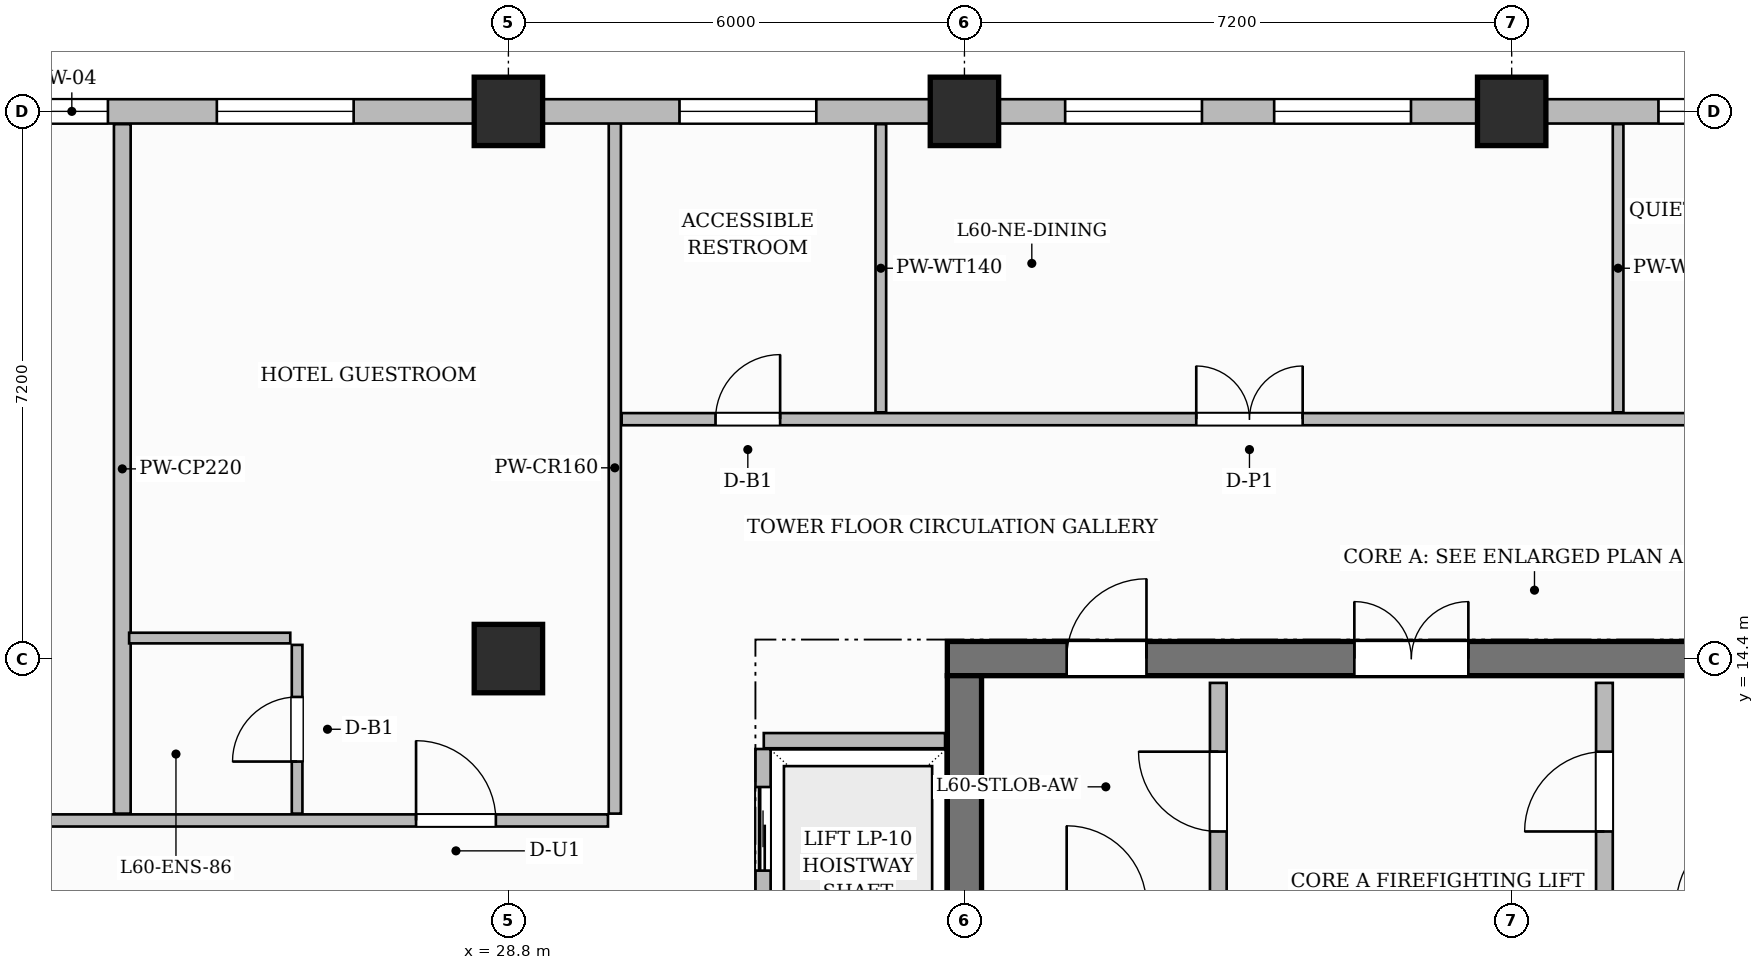
"""IFC4 building model, lengths in metres.
Left out: names, types, materials, properties, quantities, classifications, styles, units other than length and angle.
Written with IfcOpenShell. Run it as: python <this file> out.ifc"""

import sys

from ifc_helpers import new_model, si_unit, direction, frame, frame_2d, origin, origin_2d, place, context, subcontext, project, spatial, rectangle, extrude, source, transform, mapped, element, fill, save


model = new_model("IFC4")
c1 = context("Model", 3, precision=1e-05, world=origin(), true_north=direction((0.0, 1.0)))
c2 = subcontext(c1, "Body", "Model", "MODEL_VIEW")
j1 = project(units=[si_unit("LENGTHUNIT", "METRE"), si_unit("PLANEANGLEUNIT", "RADIAN")], contexts=[c1])
p1 = place(None, origin())
s1 = spatial("IfcSite", under=j1, at=p1, CompositionType="ELEMENT")
p2 = place(p1, origin())
s2 = spatial("IfcBuilding", under=s1, at=p2, CompositionType="ELEMENT")
p3 = place(p2, frame((0.0, 0.0, 240.4)))
s3 = spatial("IfcBuildingStorey", under=s2, at=p3, CompositionType="ELEMENT", Elevation=240.4)
p4 = place(p3, frame((34.575, 14.4, 0.0), z_axis=(0.0, 0.0, 1.0), x_axis=(1.0, 0.0, 0.0)))
e1 = element("IfcWall", 1, at=p4, inside=s3, PredefinedType="SHEAR", context=c2, shape_type="SweptSolid", body=[
    extrude(rectangle(XDim=15.45, YDim=0.45, at=frame_2d((7.725, 0.0))), origin(), (0.0, 0.0, 1.0), 3.85),
])
p5 = place(p4, frame((5.355, 0.0, 0.0)))
e2 = element("IfcOpeningElement", 2, at=p5, cuts=e1, PredefinedType="OPENING", context=c2, shape_type="SweptSolid", body=[
    extrude(rectangle(XDim=1.5, YDim=2.2, at=frame_2d((0.75, 1.1))), frame((0.0, 0.235, 0.0), z_axis=(0.0, -1.0, 0.0), x_axis=(1.0, 0.0, 0.0)), (0.0, 0.0, 1.0), 0.47),
])
p6 = place(p4, frame((1.57, 0.0, 0.0)))
e3 = element("IfcOpeningElement", 3, at=p6, cuts=e1, PredefinedType="OPENING", context=c2, shape_type="SweptSolid", body=[
    extrude(rectangle(XDim=1.05, YDim=2.15, at=frame_2d((0.525, 1.075))), frame((0.0, 0.235, 0.0), z_axis=(0.0, -1.0, 0.0), x_axis=(1.0, 0.0, 0.0)), (0.0, 0.0, 1.0), 0.47),
])
p7 = place(p4, frame((11.2, 0.0, 0.0)))
e4 = element("IfcOpeningElement", 4, at=p7, cuts=e1, PredefinedType="OPENING", context=c2, shape_type="SweptSolid", body=[
    extrude(rectangle(XDim=1.05, YDim=2.15, at=frame_2d((0.525, 1.075))), frame((0.0, 0.235, 0.0), z_axis=(0.0, -1.0, 0.0), x_axis=(1.0, 0.0, 0.0)), (0.0, 0.0, 1.0), 0.47),
])
p8 = place(p3, frame((34.8, 3.825, 0.0), z_axis=(0.0, 0.0, 1.0), x_axis=(0.0, 1.0, 0.0)))
e5 = element("IfcWall", 5, at=p8, inside=s3, PredefinedType="SHEAR", context=c2, shape_type="SweptSolid", body=[
    extrude(rectangle(XDim=10.35, YDim=0.45, at=frame_2d((5.175, 0.0))), origin(), (0.0, 0.0, 1.0), 3.85),
])
m1 = source(origin(), c2, "Body", "SweptSolid", [
    extrude(rectangle(XDim=0.9, YDim=0.9, at=origin_2d()), origin(), (0.0, 0.0, 1.0), 3.85),
])
for number, where, z_axis, x_axis in (
    (6, (28.8, 14.4, 0.0), (0.0, 0.0, 1.0), (1.0, 0.0, 0.0)),
    (7, (28.8, 21.6, 0.0), (0.0, 0.0, 1.0), (1.0, 0.0, 0.0)),
    (8, (34.8, 21.6, 0.0), (0.0, 0.0, 1.0), (1.0, 0.0, 0.0)),
    (9, (42.0, 21.6, 0.0), (0.0, 0.0, 1.0), (1.0, 0.0, 0.0)),
):
    element("IfcColumn", number, at=place(p3, frame(where, z_axis=z_axis, x_axis=x_axis)), inside=s3, PredefinedType="COLUMN", context=c2, shape_type="MappedRepresentation", body=[
        mapped(m1, transform((0.0, 0.0, 0.0), scale=1.0)),
    ])
p9 = place(p3, frame((38.14, 11.22, 0.0), z_axis=(0.0, 0.0, 1.0), x_axis=(0.0, 1.0, 0.0)))
e10 = element("IfcWall", 10, at=p9, inside=s3, PredefinedType="PARTITIONING", context=c2, shape_type="SweptSolid", body=[
    extrude(rectangle(XDim=2.86, YDim=0.22, at=frame_2d((1.43, 0.0))), origin(), (0.0, 0.0, 1.0), 3.6),
])
p10 = place(p9, frame((0.905, 0.0, 0.0)))
e11 = element("IfcOpeningElement", 11, at=p10, cuts=e10, PredefinedType="OPENING", context=c2, shape_type="SweptSolid", body=[
    extrude(rectangle(XDim=1.05, YDim=2.15, at=frame_2d((0.525, 1.075))), frame((0.0, 0.12, 0.0), z_axis=(0.0, -1.0, 0.0), x_axis=(1.0, 0.0, 0.0)), (0.0, 0.0, 1.0), 0.24),
])
p11 = place(p3, frame((43.22, 11.22, 0.0), z_axis=(0.0, 0.0, 1.0), x_axis=(0.0, 1.0, 0.0)))
e12 = element("IfcWall", 12, at=p11, inside=s3, PredefinedType="PARTITIONING", context=c2, shape_type="SweptSolid", body=[
    extrude(rectangle(XDim=2.86, YDim=0.22, at=frame_2d((1.43, 0.0))), origin(), (0.0, 0.0, 1.0), 3.6),
])
p12 = place(p11, frame((0.905, 0.0, 0.0)))
e13 = element("IfcOpeningElement", 13, at=p12, cuts=e12, PredefinedType="OPENING", context=c2, shape_type="SweptSolid", body=[
    extrude(rectangle(XDim=1.05, YDim=2.15, at=frame_2d((0.525, 1.075))), frame((0.0, 0.12, 0.0), z_axis=(0.0, -1.0, 0.0), x_axis=(1.0, 0.0, 0.0)), (0.0, 0.0, 1.0), 0.24),
])
p13 = place(p3, frame((32.16, 13.32, 0.0), z_axis=(0.0, 0.0, 1.0), x_axis=(1.0, 0.0, 0.0)))
e14 = element("IfcWall", 14, at=p13, inside=s3, PredefinedType="PARTITIONING", context=c2, shape_type="SweptSolid", body=[
    extrude(rectangle(XDim=2.385, YDim=0.2, at=frame_2d((1.192, 0.0))), origin(), (0.0, 0.0, 1.0), 3.6),
])
p14 = place(p3, frame((32.15, 4.39, 0.0), z_axis=(0.0, 0.0, 1.0), x_axis=(0.0, 1.0, 0.0)))
e15 = element("IfcWall", 15, at=p14, inside=s3, PredefinedType="PARTITIONING", context=c2, shape_type="SweptSolid", body=[
    extrude(rectangle(XDim=8.82, YDim=0.2, at=frame_2d((4.41, 0.0))), origin(), (0.0, 0.0, 1.0), 3.6),
])
p15 = place(p14, frame((0.5, 0.0, 0.0)))
e16 = element("IfcOpeningElement", 16, at=p15, cuts=e15, PredefinedType="OPENING", context=c2, shape_type="SweptSolid", body=[
    extrude(rectangle(XDim=1.1, YDim=2.2, at=frame_2d((0.55, 1.1))), frame((0.0, 0.11, 0.0), z_axis=(0.0, -1.0, 0.0), x_axis=(1.0, 0.0, 0.0)), (0.0, 0.0, 1.0), 0.22),
])
p16 = place(p14, frame((2.74, 0.0, 0.0)))
e17 = element("IfcOpeningElement", 17, at=p16, cuts=e15, PredefinedType="OPENING", context=c2, shape_type="SweptSolid", body=[
    extrude(rectangle(XDim=1.1, YDim=2.2, at=frame_2d((0.55, 1.1))), frame((0.0, 0.11, 0.0), z_axis=(0.0, -1.0, 0.0), x_axis=(1.0, 0.0, 0.0)), (0.0, 0.0, 1.0), 0.22),
])
p17 = place(p14, frame((4.98, 0.0, 0.0)))
e18 = element("IfcOpeningElement", 18, at=p17, cuts=e15, PredefinedType="OPENING", context=c2, shape_type="SweptSolid", body=[
    extrude(rectangle(XDim=1.1, YDim=2.2, at=frame_2d((0.55, 1.1))), frame((0.0, 0.11, 0.0), z_axis=(0.0, -1.0, 0.0), x_axis=(1.0, 0.0, 0.0)), (0.0, 0.0, 1.0), 0.22),
])
p18 = place(p14, frame((7.22, 0.0, 0.0)))
e19 = element("IfcOpeningElement", 19, at=p18, cuts=e15, PredefinedType="OPENING", context=c2, shape_type="SweptSolid", body=[
    extrude(rectangle(XDim=1.1, YDim=2.2, at=frame_2d((0.55, 1.1))), frame((0.0, 0.11, 0.0), z_axis=(0.0, -1.0, 0.0), x_axis=(1.0, 0.0, 0.0)), (0.0, 0.0, 1.0), 0.22),
])
p19 = place(p3, frame((14.568, 12.27, 0.0), z_axis=(0.0, 0.0, 1.0), x_axis=(1.0, 0.0, 0.0)))
e20 = element("IfcWall", 20, at=p19, inside=s3, PredefinedType="PARTITIONING", context=c2, shape_type="SweptSolid", body=[
    extrude(rectangle(XDim=15.542, YDim=0.16, at=frame_2d((7.771, 0.0))), origin(), (0.0, 0.0, 1.0), 3.6),
])
p20 = place(p19, frame((5.192, 0.0, 0.0)))
e21 = element("IfcOpeningElement", 21, at=p20, cuts=e20, PredefinedType="OPENING", context=c2, shape_type="SweptSolid", body=[
    extrude(rectangle(XDim=1.0, YDim=2.2, at=frame_2d((0.5, 1.1))), frame((0.0, 0.09, 0.0), z_axis=(0.0, -1.0, 0.0), x_axis=(1.0, 0.0, 0.0)), (0.0, 0.0, 1.0), 0.18),
])
p21 = place(p19, frame((13.017, 0.0, 0.0)))
e22 = element("IfcOpeningElement", 22, at=p21, cuts=e20, PredefinedType="OPENING", context=c2, shape_type="SweptSolid", body=[
    extrude(rectangle(XDim=1.05, YDim=2.25, at=frame_2d((0.525, 1.125))), frame((0.0, 0.09, 0.0), z_axis=(0.0, -1.0, 0.0), x_axis=(1.0, 0.0, 0.0)), (0.0, 0.0, 1.0), 0.18),
])
p22 = place(p3, frame((30.2, 12.36, 0.0), z_axis=(0.0, 0.0, 1.0), x_axis=(0.0, 1.0, 0.0)))
e23 = element("IfcWall", 23, at=p22, inside=s3, PredefinedType="PARTITIONING", context=c2, shape_type="SweptSolid", body=[
    extrude(rectangle(XDim=9.1, YDim=0.16, at=frame_2d((4.55, 0.0))), origin(), (0.0, 0.0, 1.0), 3.6),
])
p23 = place(p3, frame((30.29, 17.55, 0.0), z_axis=(0.0, 0.0, 1.0), x_axis=(1.0, 0.0, 0.0)))
e24 = element("IfcWall", 24, at=p23, inside=s3, PredefinedType="PARTITIONING", context=c2, shape_type="SweptSolid", body=[
    extrude(rectangle(XDim=19.37, YDim=0.16, at=frame_2d((9.685, 0.0))), origin(), (0.0, 0.0, 1.0), 3.6),
])
p24 = place(p23, frame((1.235, 0.0, 0.0)))
e25 = element("IfcOpeningElement", 25, at=p24, cuts=e24, PredefinedType="OPENING", context=c2, shape_type="SweptSolid", body=[
    extrude(rectangle(XDim=0.85, YDim=2.1, at=frame_2d((0.425, 1.05))), frame((0.0, 0.09, 0.0), z_axis=(0.0, -1.0, 0.0), x_axis=(1.0, 0.0, 0.0)), (0.0, 0.0, 1.0), 0.18),
])
p25 = place(p23, frame((7.56, 0.0, 0.0)))
e26 = element("IfcOpeningElement", 26, at=p25, cuts=e24, PredefinedType="OPENING", context=c2, shape_type="SweptSolid", body=[
    extrude(rectangle(XDim=1.4, YDim=2.35, at=frame_2d((0.7, 1.175))), frame((0.0, 0.09, 0.0), z_axis=(0.0, -1.0, 0.0), x_axis=(1.0, 0.0, 0.0)), (0.0, 0.0, 1.0), 0.18),
])
p26 = place(p23, frame((15.785, 0.0, 0.0)))
e27 = element("IfcOpeningElement", 27, at=p26, cuts=e24, PredefinedType="OPENING", context=c2, shape_type="SweptSolid", body=[
    extrude(rectangle(XDim=0.95, YDim=2.15, at=frame_2d((0.475, 1.075))), frame((0.0, 0.09, 0.0), z_axis=(0.0, -1.0, 0.0), x_axis=(1.0, 0.0, 0.0)), (0.0, 0.0, 1.0), 0.18),
])
for number, where, z_axis, x_axis in (
    (28, (33.7, 17.64, 0.0), (0.0, 0.0, 1.0), (0.0, 1.0, 0.0)),
    (29, (43.4, 17.64, 0.0), (0.0, 0.0, 1.0), (0.0, 1.0, 0.0)),
):
    element("IfcWall", number, at=place(p3, frame(where, z_axis=z_axis, x_axis=x_axis)), inside=s3, PredefinedType="PARTITIONING", context=c2, shape_type="SweptSolid", body=[
        extrude(rectangle(XDim=3.792, YDim=0.14, at=frame_2d((1.896, 0.0))), origin(), (0.0, 0.0, 1.0), 3.6),
    ])
p27 = place(p3, frame((23.72, 12.36, 0.0), z_axis=(0.0, 0.0, 1.0), x_axis=(0.0, 1.0, 0.0)))
e30 = element("IfcWall", 30, at=p27, inside=s3, PredefinedType="PARTITIONING", context=c2, shape_type="SweptSolid", body=[
    extrude(rectangle(XDim=9.072, YDim=0.22, at=frame_2d((4.536, 0.0))), origin(), (0.0, 0.0, 1.0), 3.6),
])
p28 = place(p3, frame((26.02, 12.36, 0.0), z_axis=(0.0, 0.0, 1.0), x_axis=(0.0, 1.0, 0.0)))
e31 = element("IfcWall", 31, at=p28, inside=s3, PredefinedType="PARTITIONING", context=c2, shape_type="SweptSolid", body=[
    extrude(rectangle(XDim=2.22, YDim=0.14, at=frame_2d((1.11, 0.0))), origin(), (0.0, 0.0, 1.0), 3.6),
])
p29 = place(p28, frame((0.685, 0.0, 0.0)))
e32 = element("IfcOpeningElement", 32, at=p29, cuts=e31, PredefinedType="OPENING", context=c2, shape_type="SweptSolid", body=[
    extrude(rectangle(XDim=0.85, YDim=2.1, at=frame_2d((0.425, 1.05))), frame((0.0, 0.08, 0.0), z_axis=(0.0, -1.0, 0.0), x_axis=(1.0, 0.0, 0.0)), (0.0, 0.0, 1.0), 0.16),
])
p30 = place(p3, frame((23.81, 14.67, 0.0), z_axis=(0.0, 0.0, 1.0), x_axis=(1.0, 0.0, 0.0)))
e33 = element("IfcWall", 33, at=p30, inside=s3, PredefinedType="PARTITIONING", context=c2, shape_type="SweptSolid", body=[
    extrude(rectangle(XDim=2.12, YDim=0.14, at=frame_2d((1.06, 0.0))), origin(), (0.0, 0.0, 1.0), 3.135),
])
p31 = place(p3, frame((14.4, 21.6, 0.0), z_axis=(0.0, 0.0, 1.0), x_axis=(1.0, 0.0, 0.0)))
e34 = element("IfcWall", 34, at=p31, inside=s3, PredefinedType="SOLIDWALL", context=c2, shape_type="SweptSolid", body=[
    extrude(rectangle(XDim=35.4, YDim=0.32, at=frame_2d((17.7, 0.0))), origin(), (0.0, 0.0, 1.0), 3.135),
])
p32 = place(p31, frame((0.85, 0.0, 0.0)))
e35 = element("IfcOpeningElement", 35, at=p32, cuts=e34, PredefinedType="OPENING", context=c2, shape_type="SweptSolid", body=[
    extrude(rectangle(XDim=1.2, YDim=2.2, at=frame_2d((0.6, 1.1))), frame((0.0, 0.17, 0.0), z_axis=(0.0, -1.0, 0.0), x_axis=(1.0, 0.0, 0.0)), (0.0, 0.0, 1.0), 0.34),
])
p33 = place(p31, frame((3.475, 0.0, 0.8)))
e36 = element("IfcOpeningElement", 36, at=p33, cuts=e34, PredefinedType="OPENING", context=c2, shape_type="SweptSolid", body=[
    extrude(rectangle(XDim=1.8, YDim=1.85, at=frame_2d((0.9, 0.925))), frame((0.0, 0.17, 0.0), z_axis=(0.0, -1.0, 0.0), x_axis=(1.0, 0.0, 0.0)), (0.0, 0.0, 1.0), 0.34),
])
p34 = place(p31, frame((8.181, 0.0, 0.8)))
e37 = element("IfcOpeningElement", 37, at=p34, cuts=e34, PredefinedType="OPENING", context=c2, shape_type="SweptSolid", body=[
    extrude(rectangle(XDim=0.95, YDim=1.75, at=frame_2d((0.475, 0.875))), frame((0.0, 0.17, 0.0), z_axis=(0.0, -1.0, 0.0), x_axis=(1.0, 0.0, 0.0)), (0.0, 0.0, 1.0), 0.34),
])
p35 = place(p31, frame((10.564, 0.0, 0.8)))
e38 = element("IfcOpeningElement", 38, at=p35, cuts=e34, PredefinedType="OPENING", context=c2, shape_type="SweptSolid", body=[
    extrude(rectangle(XDim=1.8, YDim=1.85, at=frame_2d((0.9, 0.925))), frame((0.0, 0.17, 0.0), z_axis=(0.0, -1.0, 0.0), x_axis=(1.0, 0.0, 0.0)), (0.0, 0.0, 1.0), 0.34),
])
p36 = place(p31, frame((16.651, 0.0, 0.8)))
e39 = element("IfcOpeningElement", 39, at=p36, cuts=e34, PredefinedType="OPENING", context=c2, shape_type="SweptSolid", body=[
    extrude(rectangle(XDim=1.8, YDim=1.85, at=frame_2d((0.9, 0.925))), frame((0.0, 0.17, 0.0), z_axis=(0.0, -1.0, 0.0), x_axis=(1.0, 0.0, 0.0)), (0.0, 0.0, 1.0), 0.34),
])
p37 = place(p31, frame((21.725, 0.0, 0.8)))
e40 = element("IfcOpeningElement", 40, at=p37, cuts=e34, PredefinedType="OPENING", context=c2, shape_type="SweptSolid", body=[
    extrude(rectangle(XDim=1.8, YDim=1.85, at=frame_2d((0.9, 0.925))), frame((0.0, 0.17, 0.0), z_axis=(0.0, -1.0, 0.0), x_axis=(1.0, 0.0, 0.0)), (0.0, 0.0, 1.0), 0.34),
])
p38 = place(p31, frame((24.475, 0.0, 0.8)))
e41 = element("IfcOpeningElement", 41, at=p38, cuts=e34, PredefinedType="OPENING", context=c2, shape_type="SweptSolid", body=[
    extrude(rectangle(XDim=1.8, YDim=1.85, at=frame_2d((0.9, 0.925))), frame((0.0, 0.17, 0.0), z_axis=(0.0, -1.0, 0.0), x_axis=(1.0, 0.0, 0.0)), (0.0, 0.0, 1.0), 0.34),
])
p39 = place(p31, frame((29.531, 0.0, 0.8)))
e42 = element("IfcOpeningElement", 42, at=p39, cuts=e34, PredefinedType="OPENING", context=c2, shape_type="SweptSolid", body=[
    extrude(rectangle(XDim=1.8, YDim=1.85, at=frame_2d((0.9, 0.925))), frame((0.0, 0.17, 0.0), z_axis=(0.0, -1.0, 0.0), x_axis=(1.0, 0.0, 0.0)), (0.0, 0.0, 1.0), 0.34),
])
p40 = place(p31, frame((32.277, 0.0, 0.8)))
e43 = element("IfcOpeningElement", 43, at=p40, cuts=e34, PredefinedType="OPENING", context=c2, shape_type="SweptSolid", body=[
    extrude(rectangle(XDim=1.8, YDim=1.85, at=frame_2d((0.9, 0.925))), frame((0.0, 0.17, 0.0), z_axis=(0.0, -1.0, 0.0), x_axis=(1.0, 0.0, 0.0)), (0.0, 0.0, 1.0), 0.34),
])
m2 = source(origin(), c2, "Body", "SweptSolid", [
    extrude(rectangle(XDim=1.05, YDim=2.15, at=frame_2d((0.525, 1.075))), frame((0.0, 0.025, 0.0), z_axis=(0.0, -1.0, 0.0), x_axis=(1.0, 0.0, 0.0)), (0.0, 0.0, 1.0), 0.05),
])
p41 = place(p10, origin())
e44 = element("IfcDoor", 44, at=p41, inside=s3, OperationType="SINGLE_SWING_RIGHT", PredefinedType="DOOR", context=c2, shape_type="MappedRepresentation", body=[
    mapped(m2, transform((0.0, 0.0, 0.0), scale=1.0)),
])
fill(e11, e44)
p42 = place(p12, origin())
e45 = element("IfcDoor", 45, at=p42, inside=s3, OperationType="SINGLE_SWING_LEFT", PredefinedType="DOOR", context=c2, shape_type="MappedRepresentation", body=[
    mapped(m2, transform((0.0, 0.0, 0.0), scale=1.0)),
])
fill(e13, e45)
m3 = source(origin(), c2, "Body", "SweptSolid", [
    extrude(rectangle(XDim=1.5, YDim=2.2, at=frame_2d((0.75, 1.1))), frame((0.0, 0.025, 0.0), z_axis=(0.0, -1.0, 0.0), x_axis=(1.0, 0.0, 0.0)), (0.0, 0.0, 1.0), 0.05),
])
p43 = place(p5, origin())
e46 = element("IfcDoor", 46, at=p43, inside=s3, OperationType="DOUBLE_DOOR_SINGLE_SWING", PredefinedType="DOOR", context=c2, shape_type="MappedRepresentation", body=[
    mapped(m3, transform((0.0, 0.0, 0.0), scale=1.0)),
])
fill(e2, e46)
p44 = place(p6, origin())
e47 = element("IfcDoor", 47, at=p44, inside=s3, OperationType="SINGLE_SWING_RIGHT", PredefinedType="DOOR", context=c2, shape_type="MappedRepresentation", body=[
    mapped(m2, transform((0.0, 0.0, 0.0), scale=1.0)),
])
fill(e3, e47)
m4 = source(origin(), c2, "Body", "SweptSolid", [
    extrude(rectangle(XDim=0.85, YDim=2.1, at=frame_2d((0.425, 1.05))), frame((0.0, 0.025, 0.0), z_axis=(0.0, -1.0, 0.0), x_axis=(1.0, 0.0, 0.0)), (0.0, 0.0, 1.0), 0.05),
])
p45 = place(p24, origin())
e48 = element("IfcDoor", 48, at=p45, inside=s3, OperationType="SINGLE_SWING_RIGHT", PredefinedType="DOOR", context=c2, shape_type="MappedRepresentation", body=[
    mapped(m4, transform((0.0, 0.0, 0.0), scale=1.0)),
])
fill(e25, e48)
m5 = source(origin(), c2, "Body", "SweptSolid", [
    extrude(rectangle(XDim=1.4, YDim=2.35, at=frame_2d((0.7, 1.175))), frame((0.0, 0.025, 0.0), z_axis=(0.0, -1.0, 0.0), x_axis=(1.0, 0.0, 0.0)), (0.0, 0.0, 1.0), 0.05),
])
p46 = place(p25, origin())
e49 = element("IfcDoor", 49, at=p46, inside=s3, OperationType="DOUBLE_DOOR_SINGLE_SWING", PredefinedType="DOOR", context=c2, shape_type="MappedRepresentation", body=[
    mapped(m5, transform((0.0, 0.0, 0.0), scale=1.0)),
])
fill(e26, e49)
p47 = place(p29, origin())
e50 = element("IfcDoor", 50, at=p47, inside=s3, OperationType="SINGLE_SWING_LEFT", PredefinedType="DOOR", context=c2, shape_type="MappedRepresentation", body=[
    mapped(m4, transform((0.0, 0.0, 0.0), scale=1.0)),
])
fill(e32, e50)
m6 = source(origin(), c2, "Body", "SweptSolid", [
    extrude(rectangle(XDim=1.05, YDim=2.25, at=frame_2d((0.525, 1.125))), frame((0.0, 0.025, 0.0), z_axis=(0.0, -1.0, 0.0), x_axis=(1.0, 0.0, 0.0)), (0.0, 0.0, 1.0), 0.05),
])
p48 = place(p21, origin())
e51 = element("IfcDoor", 51, at=p48, inside=s3, OperationType="SINGLE_SWING_LEFT", PredefinedType="DOOR", context=c2, shape_type="MappedRepresentation", body=[
    mapped(m6, transform((0.0, 0.0, 0.0), scale=1.0)),
])
fill(e22, e51)
m7 = source(origin(), c2, "Body", "SweptSolid", [
    extrude(rectangle(XDim=1.1, YDim=2.2, at=frame_2d((0.55, 1.1))), frame((0.0, 0.025, 0.0), z_axis=(0.0, -1.0, 0.0), x_axis=(1.0, 0.0, 0.0)), (0.0, 0.0, 1.0), 0.05),
])
p49 = place(p18, origin())
e52 = element("IfcDoor", 52, at=p49, inside=s3, OperationType="SLIDING_TO_LEFT", PredefinedType="DOOR", context=c2, shape_type="MappedRepresentation", body=[
    mapped(m7, transform((0.0, 0.0, 0.0), scale=1.0)),
])
fill(e19, e52)
m8 = source(origin(), c2, "Body", "SweptSolid", [
    extrude(rectangle(XDim=0.95, YDim=1.75, at=frame_2d((0.475, 0.875))), frame((0.0, 0.03, 0.0), z_axis=(0.0, -1.0, 0.0), x_axis=(1.0, 0.0, 0.0)), (0.0, 0.0, 1.0), 0.06),
])
p50 = place(p34, origin())
e53 = element("IfcWindow", 53, at=p50, inside=s3, PartitioningType="SINGLE_PANEL", PredefinedType="WINDOW", context=c2, shape_type="MappedRepresentation", body=[
    mapped(m8, transform((0.0, 0.0, 0.0), scale=1.0)),
])
fill(e37, e53)
m9 = source(origin(), c2, "Body", "SweptSolid", [
    extrude(rectangle(XDim=1.8, YDim=1.85, at=frame_2d((0.9, 0.925))), frame((0.0, 0.03, 0.0), z_axis=(0.0, -1.0, 0.0), x_axis=(1.0, 0.0, 0.0)), (0.0, 0.0, 1.0), 0.06),
])
p51 = place(p35, origin())
e54 = element("IfcWindow", 54, at=p51, inside=s3, PartitioningType="DOUBLE_PANEL_VERTICAL", PredefinedType="WINDOW", context=c2, shape_type="MappedRepresentation", body=[
    mapped(m9, transform((0.0, 0.0, 0.0), scale=1.0)),
])
fill(e38, e54)
p52 = place(p36, origin())
e55 = element("IfcWindow", 55, at=p52, inside=s3, PartitioningType="DOUBLE_PANEL_VERTICAL", PredefinedType="WINDOW", context=c2, shape_type="MappedRepresentation", body=[
    mapped(m9, transform((0.0, 0.0, 0.0), scale=1.0)),
])
fill(e39, e55)
p53 = place(p37, origin())
e56 = element("IfcWindow", 56, at=p53, inside=s3, PartitioningType="DOUBLE_PANEL_VERTICAL", PredefinedType="WINDOW", context=c2, shape_type="MappedRepresentation", body=[
    mapped(m9, transform((0.0, 0.0, 0.0), scale=1.0)),
])
fill(e40, e56)
p54 = place(p38, origin())
e57 = element("IfcWindow", 57, at=p54, inside=s3, PartitioningType="DOUBLE_PANEL_VERTICAL", PredefinedType="WINDOW", context=c2, shape_type="MappedRepresentation", body=[
    mapped(m9, transform((0.0, 0.0, 0.0), scale=1.0)),
])
fill(e41, e57)
p55 = place(p39, origin())
e58 = element("IfcWindow", 58, at=p55, inside=s3, PartitioningType="DOUBLE_PANEL_VERTICAL", PredefinedType="WINDOW", context=c2, shape_type="MappedRepresentation", body=[
    mapped(m9, transform((0.0, 0.0, 0.0), scale=1.0)),
])
fill(e42, e58)
save(model, sys.argv[1])
